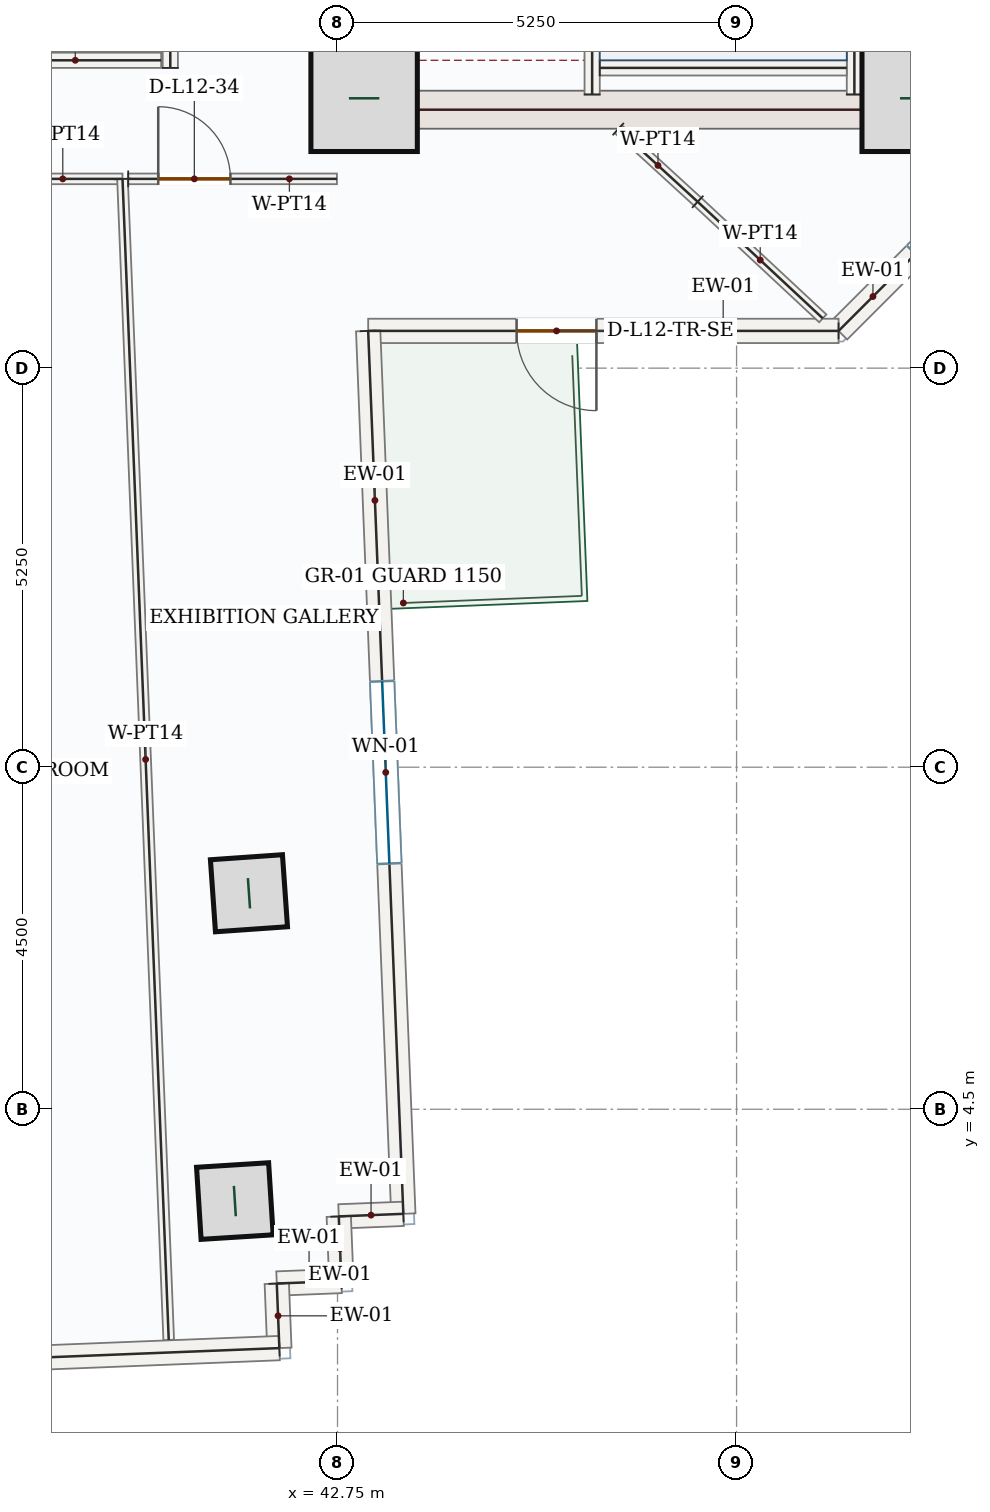
"""IFC4 building model, lengths in metres.
Left out: names, types, materials, properties, quantities, classifications, styles, units other than length and angle.
Written with IfcOpenShell. Run it as: python <this file> out.ifc"""

import sys

from ifc_helpers import new_model, si_unit, direction, frame, frame_2d, origin, origin_2d, place, context, subcontext, project, spatial, rectangle, hollow_rectangle, extrude, source, transform, mapped, element, fill, save


model = new_model("IFC4")
c1 = context("Model", 3, precision=1e-05, world=origin(), true_north=direction((0.0, 1.0)))
c2 = subcontext(c1, "Body", "Model", "MODEL_VIEW")
j1 = project(units=[si_unit("LENGTHUNIT", "METRE"), si_unit("PLANEANGLEUNIT", "RADIAN")], contexts=[c1])
p1 = place(None, origin())
s1 = spatial("IfcSite", under=j1, at=p1, CompositionType="ELEMENT")
p2 = place(p1, origin())
s2 = spatial("IfcBuilding", under=s1, at=p2, CompositionType="ELEMENT")
p3 = place(p2, frame((0.0, 0.0, 58.5)))
s3 = spatial("IfcBuildingStorey", under=s2, at=p3, CompositionType="ELEMENT", Elevation=58.5)
p4 = place(p3, frame((43.0, 17.4, 0.0), z_axis=(0.0, 0.0, 1.0), x_axis=(0.0, 1.0, 0.0)))
e1 = element("IfcWall", 1, at=p4, inside=s3, PredefinedType="SHEAR", context=c2, shape_type="SweptSolid", body=[
    extrude(rectangle(XDim=8.55, YDim=0.5, at=frame_2d((4.275, 0.0))), origin(), (0.0, 0.0, 1.0), 3.95),
])
p5 = place(p4, frame((6.65, 0.0, 0.0)))
e2 = element("IfcOpeningElement", 2, at=p5, cuts=e1, PredefinedType="OPENING", context=c2, shape_type="SweptSolid", body=[
    extrude(rectangle(XDim=1.1, YDim=2.2, at=frame_2d((0.55, 1.1))), frame((0.0, 0.26, 0.0), z_axis=(0.0, -1.0, 0.0), x_axis=(1.0, 0.0, 0.0)), (0.0, 0.0, 1.0), 0.52),
])
p6 = place(p4, frame((1.75, 0.0, 0.0)))
e3 = element("IfcOpeningElement", 3, at=p6, cuts=e1, PredefinedType="OPENING", context=c2, shape_type="SweptSolid", body=[
    extrude(rectangle(XDim=1.3, YDim=2.2, at=frame_2d((0.65, 1.1))), frame((0.0, 0.26, 0.0), z_axis=(0.0, -1.0, 0.0), x_axis=(1.0, 0.0, 0.0)), (0.0, 0.0, 1.0), 0.52),
])
p7 = place(p4, frame((4.3, 0.0, 0.0)))
e4 = element("IfcOpeningElement", 4, at=p7, cuts=e1, PredefinedType="OPENING", context=c2, shape_type="SweptSolid", body=[
    extrude(rectangle(XDim=0.88, YDim=2.1, at=frame_2d((0.44, 1.05))), frame((0.0, 0.26, 0.0), z_axis=(0.0, -1.0, 0.0), x_axis=(1.0, 0.0, 0.0)), (0.0, 0.0, 1.0), 0.52),
])
m1 = source(origin(), c2, "Body", "SweptSolid", [
    extrude(rectangle(XDim=8.55, YDim=0.5, at=frame_2d((4.275, 0.0))), origin(), (0.0, 0.0, 1.0), 3.95),
])
p8 = place(p3, frame((50.5, 17.4, 0.0), z_axis=(0.0, 0.0, 1.0), x_axis=(0.0, 1.0, 0.0)))
e5 = element("IfcWall", 5, at=p8, inside=s3, PredefinedType="SHEAR", context=c2, shape_type="MappedRepresentation", body=[
    mapped(m1, transform((0.0, 0.0, 0.0), x_axis=(1.0, 0.0, 0.0), y_axis=(0.0, 1.0, 0.0), z_axis=(0.0, 0.0, 1.0), scale=1.0)),
])
m2 = source(origin(), c2, "Body", "SweptSolid", [
    extrude(rectangle(XDim=7.0, YDim=0.5, at=frame_2d((3.5, 0.0))), origin(), (0.0, 0.0, 1.0), 3.95),
])
p9 = place(p3, frame((43.25, 17.65, 0.0), z_axis=(0.0, 0.0, 1.0), x_axis=(1.0, 0.0, 0.0)))
e6 = element("IfcWall", 6, at=p9, inside=s3, PredefinedType="SHEAR", context=c2, shape_type="MappedRepresentation", body=[
    mapped(m2, transform((0.0, 0.0, 0.0), x_axis=(1.0, 0.0, 0.0), y_axis=(0.0, 1.0, 0.0), z_axis=(0.0, 0.0, 1.0), scale=1.0)),
])
m3 = source(origin(), c2, "Body", "SweptSolid", [
    extrude(rectangle(XDim=1.4, YDim=1.4, at=origin_2d()), origin(), (0.0, 0.0, 1.0), 4.2),
])
for number, where, z_axis, x_axis in (
    (7, (43.1, 17.8, 0.0), (0.0, 0.0, 1.0), (1.0, 0.0, 0.0)),
    (8, (50.35, 17.8, 0.0), (0.0, 0.0, 1.0), (1.0, 0.0, 0.0)),
):
    element("IfcColumn", number, at=place(p3, frame(where, z_axis=z_axis, x_axis=x_axis)), inside=s3, PredefinedType="COLUMN", context=c2, shape_type="MappedRepresentation", body=[
        mapped(m3, transform((0.0, 0.0, 0.0), x_axis=(1.0, 0.0, 0.0), y_axis=(0.0, 1.0, 0.0), z_axis=(0.0, 0.0, 1.0), scale=1.0)),
    ])
m4 = source(origin(), c2, "Body", "SweptSolid", [
    extrude(hollow_rectangle(XDim=0.95, YDim=0.95, WallThickness=0.05, at=origin_2d()), origin(), (0.0, 0.0, 1.0), 4.2),
])
for number, where, z_axis, x_axis in (
    (9, (41.585, 7.342, 0.0), (0.0, 0.0, 1.0), (-0.07, 0.998, 0.0)),
    (10, (41.399, 3.292, 0.0), (0.0, 0.0, 1.0), (-0.063, 0.998, 0.0)),
):
    element("IfcColumn", number, at=place(p3, frame(where, z_axis=z_axis, x_axis=x_axis)), inside=s3, PredefinedType="COLUMN", context=c2, shape_type="MappedRepresentation", body=[
        mapped(m4, transform((0.0, 0.0, 0.0), x_axis=(1.0, 0.0, 0.0), y_axis=(0.0, 1.0, 0.0), z_axis=(0.0, 0.0, 1.0), scale=1.0)),
    ])
p10 = place(p3, frame((53.06, 18.458, 0.0), z_axis=(0.0, 0.0, 1.0), x_axis=(-0.707106781187, -0.707106781187, 0.0)))
e11 = element("IfcWall", 11, at=p10, inside=s3, PredefinedType="SOLIDWALL", context=c2, shape_type="SweptSolid", body=[
    extrude(rectangle(XDim=5.258, YDim=0.32, at=frame_2d((2.629, 0.0))), origin(), (0.0, 0.0, 1.0), 3.95),
])
p11 = place(p10, frame((1.429, 0.0, 0.85)))
e12 = element("IfcOpeningElement", 12, at=p11, cuts=e11, PredefinedType="OPENING", context=c2, shape_type="SweptSolid", body=[
    extrude(rectangle(XDim=2.4, YDim=1.8, at=frame_2d((1.2, 0.9))), frame((0.0, 0.17, 0.0), z_axis=(0.0, -1.0, 0.0), x_axis=(1.0, 0.0, 0.0)), (0.0, 0.0, 1.0), 0.34),
])
p12 = place(p3, frame((49.342, 14.74, 0.0), z_axis=(0.0, 0.0, 1.0), x_axis=(-1.0, 0.0, 0.0)))
e13 = element("IfcWall", 13, at=p12, inside=s3, PredefinedType="SOLIDWALL", context=c2, shape_type="SweptSolid", body=[
    extrude(rectangle(XDim=6.189, YDim=0.32, at=frame_2d((3.094, 0.0))), origin(), (0.0, 0.0, 1.0), 3.95),
])
p13 = place(p12, frame((3.186, 0.0, 0.0)))
e14 = element("IfcOpeningElement", 14, at=p13, cuts=e13, PredefinedType="OPENING", context=c2, shape_type="SweptSolid", body=[
    extrude(rectangle(XDim=1.05, YDim=2.15, at=frame_2d((0.525, 1.075))), frame((0.0, 0.17, 0.0), z_axis=(0.0, -1.0, 0.0), x_axis=(1.0, 0.0, 0.0)), (0.0, 0.0, 1.0), 0.34),
])
p14 = place(p3, frame((43.153, 14.74, 0.0), z_axis=(0.0, 0.0, 1.0), x_axis=(0.039775975357, -0.999208622753, 0.0)))
e15 = element("IfcWall", 15, at=p14, inside=s3, PredefinedType="SOLIDWALL", context=c2, shape_type="SweptSolid", body=[
    extrude(rectangle(XDim=11.625, YDim=0.32, at=frame_2d((5.812, 0.0))), origin(), (0.0, 0.0, 1.0), 3.95),
])
p15 = place(p14, frame((4.613, 0.0, 0.85)))
e16 = element("IfcOpeningElement", 16, at=p15, cuts=e15, PredefinedType="OPENING", context=c2, shape_type="SweptSolid", body=[
    extrude(rectangle(XDim=2.4, YDim=1.8, at=frame_2d((1.2, 0.9))), frame((0.0, 0.17, 0.0), z_axis=(0.0, -1.0, 0.0), x_axis=(1.0, 0.0, 0.0)), (0.0, 0.0, 1.0), 0.34),
])
m5 = source(origin(), c2, "Body", "SweptSolid", [
    extrude(rectangle(XDim=0.85, YDim=0.32, at=frame_2d((0.425, 0.0))), origin(), (0.0, 0.0, 1.0), 3.95),
])
for number, where, z_axis, x_axis in (
    (17, (43.616, 3.124, 0.0), (0.0, 0.0, 1.0), (-0.999, -0.04, 0.0)),
    (18, (42.767, 3.09, 0.0), (0.0, 0.0, 1.0), (0.04, -0.999, 0.0)),
):
    element("IfcWall", number, at=place(p3, frame(where, z_axis=z_axis, x_axis=x_axis)), inside=s3, PredefinedType="SOLIDWALL", context=c2, shape_type="MappedRepresentation", body=[
        mapped(m5, transform((0.0, 0.0, 0.0), x_axis=(1.0, 0.0, 0.0), y_axis=(0.0, 1.0, 0.0), z_axis=(0.0, 0.0, 1.0), scale=1.0)),
    ])
m6 = source(origin(), c2, "Body", "SweptSolid", [
    extrude(rectangle(XDim=0.85, YDim=0.32, at=frame_2d((0.425, 0.0))), origin(), (0.0, 0.0, 1.0), 3.95),
])
p16 = place(p3, frame((42.8, 2.241, 0.0), z_axis=(0.0, 0.0, 1.0), x_axis=(-0.999202792875, -0.039922158152, 0.0)))
e19 = element("IfcWall", 19, at=p16, inside=s3, PredefinedType="SOLIDWALL", context=c2, shape_type="MappedRepresentation", body=[
    mapped(m6, transform((0.0, 0.0, 0.0), x_axis=(1.0, 0.0, 0.0), y_axis=(0.0, 1.0, 0.0), z_axis=(0.0, 0.0, 1.0), scale=1.0)),
])
p17 = place(p3, frame((41.951, 2.207, 0.0), z_axis=(0.0, 0.0, 1.0), x_axis=(0.039933618331, -0.999202334929, 0.0)))
e20 = element("IfcWall", 20, at=p17, inside=s3, PredefinedType="SOLIDWALL", context=c2, shape_type="MappedRepresentation", body=[
    mapped(m5, transform((0.0, 0.0, 0.0), x_axis=(1.0, 0.0, 0.0), y_axis=(0.0, 1.0, 0.0), z_axis=(0.0, 0.0, 1.0), scale=1.0)),
])
m7 = source(origin(), c2, "Body", "SweptSolid", [
    extrude(rectangle(XDim=9.92, YDim=0.32, at=frame_2d((4.96, 0.0))), origin(), (0.0, 0.0, 1.0), 3.95),
])
p18 = place(p3, frame((41.985, 1.358, 0.0), z_axis=(0.0, 0.0, 1.0), x_axis=(-0.999207823998, -0.039796035749, 0.0)))
e21 = element("IfcWall", 21, at=p18, inside=s3, PredefinedType="SOLIDWALL", context=c2, shape_type="MappedRepresentation", body=[
    mapped(m7, transform((0.0, 0.0, 0.0), x_axis=(1.0, 0.0, 0.0), y_axis=(0.0, 1.0, 0.0), z_axis=(0.0, 0.0, 1.0), scale=1.0)),
])
m8 = source(origin(), c2, "Body", "SweptSolid", [
    extrude(rectangle(XDim=7.87, YDim=0.2, at=frame_2d((3.935, 0.0))), origin(), (0.0, 0.0, 1.0), 3.95),
])
p19 = place(p3, frame((49.55, 17.85, 0.0), z_axis=(0.0, 0.0, 1.0), x_axis=(0.0, 1.0, 0.0)))
e22 = element("IfcWall", 22, at=p19, inside=s3, PredefinedType="SOLIDWALL", context=c2, shape_type="MappedRepresentation", body=[
    mapped(m8, transform((0.0, 0.0, 0.0), x_axis=(1.0, 0.0, 0.0), y_axis=(0.0, 1.0, 0.0), z_axis=(0.0, 0.0, 1.0), scale=1.0)),
])
p20 = place(p3, frame((46.1, 17.85, 0.0), z_axis=(0.0, 0.0, 1.0), x_axis=(0.0, 1.0, 0.0)))
e23 = element("IfcWall", 23, at=p20, inside=s3, PredefinedType="SOLIDWALL", context=c2, shape_type="SweptSolid", body=[
    extrude(rectangle(XDim=8.0, YDim=0.2, at=frame_2d((4.0, 0.0))), origin(), (0.0, 0.0, 1.0), 3.95),
])
p21 = place(p20, frame((6.3, 0.0, 0.0)))
e24 = element("IfcOpeningElement", 24, at=p21, cuts=e23, PredefinedType="OPENING", context=c2, shape_type="SweptSolid", body=[
    extrude(rectangle(XDim=1.05, YDim=2.15, at=frame_2d((0.525, 1.075))), frame((0.0, 0.11, 0.0), z_axis=(0.0, -1.0, 0.0), x_axis=(1.0, 0.0, 0.0)), (0.0, 0.0, 1.0), 0.22),
])
m9 = source(origin(), c2, "Body", "SweptSolid", [
    extrude(rectangle(XDim=3.25, YDim=0.2, at=frame_2d((1.625, 0.0))), origin(), (0.0, 0.0, 1.0), 3.95),
])
p22 = place(p3, frame((46.2, 18.2, 0.0), z_axis=(0.0, 0.0, 1.0), x_axis=(1.0, 0.0, 0.0)))
e25 = element("IfcWall", 25, at=p22, inside=s3, PredefinedType="SOLIDWALL", context=c2, shape_type="MappedRepresentation", body=[
    mapped(m9, transform((0.0, 0.0, 0.0), x_axis=(1.0, 0.0, 0.0), y_axis=(0.0, 1.0, 0.0), z_axis=(0.0, 0.0, 1.0), scale=1.0)),
])
m10 = source(origin(), c2, "Body", "SweptSolid", [
    extrude(rectangle(XDim=2.35, YDim=0.2, at=frame_2d((1.175, 0.0))), origin(), (0.0, 0.0, 1.0), 3.95),
])
p23 = place(p3, frame((40.55, 18.2, 0.0), z_axis=(0.0, 0.0, 1.0), x_axis=(0.0, 1.0, 0.0)))
e26 = element("IfcWall", 26, at=p23, inside=s3, PredefinedType="SOLIDWALL", context=c2, shape_type="MappedRepresentation", body=[
    mapped(m10, transform((0.0, 0.0, 0.0), x_axis=(1.0, 0.0, 0.0), y_axis=(0.0, 1.0, 0.0), z_axis=(0.0, 0.0, 1.0), scale=1.0)),
])
m11 = source(origin(), c2, "Body", "SweptSolid", [
    extrude(rectangle(XDim=2.26, YDim=0.2, at=frame_2d((1.13, 0.0))), origin(), (0.0, 0.0, 1.0), 3.95),
])
p24 = place(p3, frame((38.17, 18.3, 0.0), z_axis=(0.0, 0.0, 1.0), x_axis=(1.0, 0.0, 0.0)))
e27 = element("IfcWall", 27, at=p24, inside=s3, PredefinedType="SOLIDWALL", context=c2, shape_type="MappedRepresentation", body=[
    mapped(m11, transform((0.0, 0.0, 0.0), x_axis=(1.0, 0.0, 0.0), y_axis=(0.0, 1.0, 0.0), z_axis=(0.0, 0.0, 1.0), scale=1.0)),
])
p25 = place(p3, frame((36.764, 16.74, 0.0), z_axis=(0.0, 0.0, 1.0), x_axis=(1.0, 0.0, 0.0)))
e28 = element("IfcWall", 28, at=p25, inside=s3, PredefinedType="PARTITIONING", context=c2, shape_type="SweptSolid", body=[
    extrude(rectangle(XDim=3.157, YDim=0.14, at=frame_2d((1.579, 0.0))), origin(), (0.0, 0.0, 1.0), 3.95),
])
p26 = place(p25, frame((0.486, 0.0, 0.0)))
e29 = element("IfcOpeningElement", 29, at=p26, cuts=e28, PredefinedType="OPENING", context=c2, shape_type="SweptSolid", body=[
    extrude(rectangle(XDim=0.95, YDim=2.15, at=frame_2d((0.475, 1.075))), frame((0.0, 0.08, 0.0), z_axis=(0.0, -1.0, 0.0), x_axis=(1.0, 0.0, 0.0)), (0.0, 0.0, 1.0), 0.16),
])
m12 = source(origin(), c2, "Body", "SweptSolid", [
    extrude(rectangle(XDim=15.286, YDim=0.14, at=frame_2d((7.643, 0.0))), origin(), (0.0, 0.0, 1.0), 3.95),
])
p27 = place(p3, frame((39.921, 16.739, 0.0), z_axis=(0.0, 0.0, 1.0), x_axis=(0.039769031662, -0.99920889914, 0.0)))
e30 = element("IfcWall", 30, at=p27, inside=s3, PredefinedType="PARTITIONING", context=c2, shape_type="MappedRepresentation", body=[
    mapped(m12, transform((0.0, 0.0, 0.0), x_axis=(1.0, 0.0, 0.0), y_axis=(0.0, 1.0, 0.0), z_axis=(0.0, 0.0, 1.0), scale=1.0)),
])
p28 = place(p3, frame((39.996, 16.74, 0.0), z_axis=(0.0, 0.0, 1.0), x_axis=(0.999999996048, 8.8904694e-05, 0.0)))
e31 = element("IfcWall", 31, at=p28, inside=s3, PredefinedType="PARTITIONING", context=c2, shape_type="SweptSolid", body=[
    extrude(rectangle(XDim=2.746, YDim=0.14, at=frame_2d((1.373, 0.0))), origin(), (0.0, 0.0, 1.0), 3.95),
])
p29 = place(p28, frame((0.395, 0.0, 0.0)))
e32 = element("IfcOpeningElement", 32, at=p29, cuts=e31, PredefinedType="OPENING", context=c2, shape_type="SweptSolid", body=[
    extrude(rectangle(XDim=0.95, YDim=2.15, at=frame_2d((0.475, 1.075))), frame((0.0, 0.08, 0.0), z_axis=(0.0, -1.0, 0.0), x_axis=(1.0, 0.0, 0.0)), (0.0, 0.0, 1.0), 0.16),
])
m13 = source(origin(), c2, "Body", "SweptSolid", [
    extrude(rectangle(XDim=1.417, YDim=0.14, at=frame_2d((0.708, 0.0))), origin(), (0.0, 0.0, 1.0), 3.95),
])
p30 = place(p3, frame((46.443, 17.395, 0.0), z_axis=(0.0, 0.0, 1.0), x_axis=(0.737776192982, -0.675045397784, 0.0)))
e33 = element("IfcWall", 33, at=p30, inside=s3, PredefinedType="PARTITIONING", context=c2, shape_type="MappedRepresentation", body=[
    mapped(m13, transform((0.0, 0.0, 0.0), x_axis=(1.0, 0.0, 0.0), y_axis=(0.0, 1.0, 0.0), z_axis=(0.0, 0.0, 1.0), scale=1.0)),
])
m14 = source(origin(), c2, "Body", "SweptSolid", [
    extrude(rectangle(XDim=2.25, YDim=0.14, at=frame_2d((1.125, 0.0))), origin(), (0.0, 0.0, 1.0), 3.95),
])
p31 = place(p3, frame((47.489, 16.439, 0.0), z_axis=(0.0, 0.0, 1.0), x_axis=(0.731524295554, -0.68181537458, 0.0)))
e34 = element("IfcWall", 34, at=p31, inside=s3, PredefinedType="PARTITIONING", context=c2, shape_type="MappedRepresentation", body=[
    mapped(m14, transform((0.0, 0.0, 0.0), x_axis=(1.0, 0.0, 0.0), y_axis=(0.0, 1.0, 0.0), z_axis=(0.0, 0.0, 1.0), scale=1.0)),
])
m15 = source(origin(), c2, "Body", "SweptSolid", [
    extrude(rectangle(XDim=1.05, YDim=2.15, at=frame_2d((0.525, 1.075))), frame((0.0, 0.025, 0.0), z_axis=(0.0, -1.0, 0.0), x_axis=(1.0, 0.0, 0.0)), (0.0, 0.0, 1.0), 0.05),
])
p32 = place(p13, origin())
e35 = element("IfcDoor", 35, at=p32, inside=s3, OperationType="SINGLE_SWING_LEFT", PredefinedType="DOOR", context=c2, shape_type="MappedRepresentation", body=[
    mapped(m15, transform((0.0, 0.0, 0.0), x_axis=(1.0, 0.0, 0.0), y_axis=(0.0, 1.0, 0.0), z_axis=(0.0, 0.0, 1.0), scale=1.0)),
])
fill(e14, e35)
m16 = source(origin(), c2, "Body", "SweptSolid", [
    extrude(rectangle(XDim=2.4, YDim=1.8, at=frame_2d((1.2, 0.9))), frame((0.0, 0.03, 0.0), z_axis=(0.0, -1.0, 0.0), x_axis=(1.0, 0.0, 0.0)), (0.0, 0.0, 1.0), 0.06),
])
p33 = place(p15, origin())
e36 = element("IfcWindow", 36, at=p33, inside=s3, PartitioningType="DOUBLE_PANEL_VERTICAL", PredefinedType="WINDOW", context=c2, shape_type="MappedRepresentation", body=[
    mapped(m16, transform((0.0, 0.0, 0.0), x_axis=(1.0, 0.0, 0.0), y_axis=(0.0, 1.0, 0.0), z_axis=(0.0, 0.0, 1.0), scale=1.0)),
])
fill(e16, e36)
m17 = source(origin(), c2, "Body", "SweptSolid", [
    extrude(rectangle(XDim=0.95, YDim=2.15, at=frame_2d((0.475, 1.075))), frame((0.0, 0.025, 0.0), z_axis=(0.0, -1.0, 0.0), x_axis=(1.0, 0.0, 0.0)), (0.0, 0.0, 1.0), 0.05),
])
p34 = place(p29, origin())
e37 = element("IfcDoor", 37, at=p34, inside=s3, OperationType="SINGLE_SWING_LEFT", PredefinedType="DOOR", context=c2, shape_type="MappedRepresentation", body=[
    mapped(m17, transform((0.0, 0.0, 0.0), x_axis=(1.0, 0.0, 0.0), y_axis=(0.0, 1.0, 0.0), z_axis=(0.0, 0.0, 1.0), scale=1.0)),
])
fill(e32, e37)
save(model, sys.argv[1])
